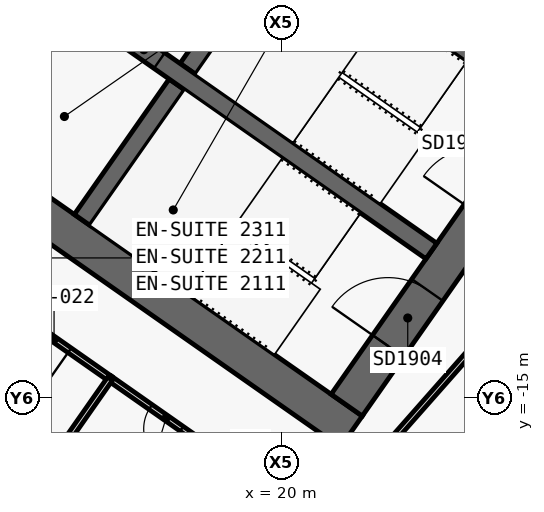
"""IFC4 building model, lengths in metres.
Left out: names, types, materials, properties, quantities, classifications, styles, units other than length and angle.
Written with IfcOpenShell. Run it as: python <this file> out.ifc"""

import sys

from ifc_helpers import new_model, si_unit, direction, frame, frame_2d, origin, place, context, subcontext, project, spatial, polyline, rectangle, outline, extrude, element, fill, save


model = new_model("IFC4")
c1 = context("Model", 3, precision=1e-05, world=origin(), true_north=direction((0.0, 1.0)))
c2 = subcontext(c1, "Body", "Model", "MODEL_VIEW")
j1 = project(units=[si_unit("LENGTHUNIT", "METRE"), si_unit("PLANEANGLEUNIT", "RADIAN")], contexts=[c1])
p1 = place(None, origin())
s1 = spatial("IfcSite", under=j1, at=p1, CompositionType="ELEMENT")
p2 = place(p1, origin())
s2 = spatial("IfcBuilding", under=s1, at=p2, CompositionType="ELEMENT")
p3 = place(p2, frame((0.0, 0.0, 101.3)))
s3 = spatial("IfcBuildingStorey", under=s2, at=p3, CompositionType="ELEMENT", Elevation=101.3)
p4 = place(p3, frame((-0.037, 11.867, 0.0), z_axis=(0.0, 0.0, 1.0), x_axis=(0.819155306259, -0.573571777746, 0.0)))
e1 = element("IfcWall", 1, at=p4, inside=s3, PredefinedType="SHEAR", context=c2, shape_type="SweptSolid", body=[
    extrude(outline(polyline([(33.837, 0.5), (0.0, 0.5), (0.7, -0.5), (33.837, -0.5), (33.837, 0.5)])), origin(), (0.0, 0.0, 1.0), 3.6),
])
p5 = place(p3, frame((-0.037, -0.585, 0.0), z_axis=(0.0, 0.0, 1.0), x_axis=(0.819157152511, -0.573569140985, 0.0)))
e2 = element("IfcWall", 2, at=p5, inside=s3, PredefinedType="SHEAR", context=c2, shape_type="SweptSolid", body=[
    extrude(outline(polyline([(26.695, 0.5), (0.0, 0.5), (0.7, -0.5), (26.695, -0.5), (26.695, 0.5)])), origin(), (0.0, 0.0, 1.0), 3.6),
])
p6 = place(p5, frame((1.045, 0.0, 0.0)))
e3 = element("IfcOpeningElement", 3, at=p6, cuts=e2, PredefinedType="OPENING", context=c2, shape_type="SweptSolid", body=[
    extrude(rectangle(XDim=1.5, YDim=2.1, at=frame_2d((0.75, 1.05))), frame((0.0, 0.51, 0.0), z_axis=(0.0, -1.0, 0.0), x_axis=(1.0, 0.0, 0.0)), (0.0, 0.0, 1.0), 1.02),
])
p7 = place(p5, frame((12.445, 0.0, 0.0)))
e4 = element("IfcOpeningElement", 4, at=p7, cuts=e2, PredefinedType="OPENING", context=c2, shape_type="SweptSolid", body=[
    extrude(rectangle(XDim=1.5, YDim=2.1, at=frame_2d((0.75, 1.05))), frame((0.0, 0.51, 0.0), z_axis=(0.0, -1.0, 0.0), x_axis=(1.0, 0.0, 0.0)), (0.0, 0.0, 1.0), 1.02),
])
p8 = place(p3, frame((21.708, -15.2, 0.0), z_axis=(0.0, 0.0, 1.0), x_axis=(0.573576324356, 0.819152122709, 0.0)))
e5 = element("IfcWall", 5, at=p8, inside=s3, PredefinedType="SHEAR", context=c2, shape_type="SweptSolid", body=[
    extrude(outline(polyline([(9.2, 0.5), (0.0, 0.5), (0.0, -0.5), (9.2, -0.5), (9.2, 0.5)])), origin(), (0.0, 0.0, 1.0), 3.6),
])
p9 = place(p8, frame((6.1, 0.0, 0.0)))
e6 = element("IfcOpeningElement", 6, at=p9, cuts=e5, PredefinedType="OPENING", context=c2, shape_type="SweptSolid", body=[
    extrude(rectangle(XDim=1.8, YDim=2.1, at=frame_2d((0.9, 1.05))), frame((0.0, 0.51, 0.0), z_axis=(0.0, -1.0, 0.0), x_axis=(1.0, 0.0, 0.0)), (0.0, 0.0, 1.0), 1.02),
])
p10 = place(p8, frame((1.9, 0.0, 0.0)))
e7 = element("IfcOpeningElement", 7, at=p10, cuts=e5, PredefinedType="OPENING", context=c2, shape_type="SweptSolid", body=[
    extrude(rectangle(XDim=1.8, YDim=2.1, at=frame_2d((0.9, 1.05))), frame((0.0, 0.51, 0.0), z_axis=(0.0, -1.0, 0.0), x_axis=(1.0, 0.0, 0.0)), (0.0, 0.0, 1.0), 1.02),
])
p11 = place(p3, frame((14.745, -10.324, 0.0), z_axis=(0.0, 0.0, 1.0), x_axis=(0.57356780395, 0.819158088694, 0.0)))
e8 = element("IfcWall", 8, at=p11, inside=s3, PredefinedType="SHEAR", context=c2, shape_type="SweptSolid", body=[
    extrude(outline(polyline([(0.0, 0.25), (0.0, -0.25), (4.35, -0.25), (4.35, 0.25), (0.0, 0.25)])), origin(), (0.0, 0.0, 1.0), 3.6),
])
p12 = place(p3, frame((17.527, -6.352, 0.0), z_axis=(0.0, 0.0, 1.0), x_axis=(0.573530143085, 0.819184457233, 0.0)))
e9 = element("IfcWall", 9, at=p12, inside=s3, PredefinedType="SHEAR", context=c2, shape_type="SweptSolid", body=[
    extrude(outline(polyline([(4.35, -0.25), (4.35, 0.25), (0.0, 0.25), (0.0, -0.25), (4.35, -0.25)])), origin(), (0.0, 0.0, 1.0), 3.6),
])
p13 = place(p3, frame((2.638, 3.768, 0.0), z_axis=(0.0, 0.0, 1.0), x_axis=(0.819148977158, -0.573580816643, 0.0)))
e10 = element("IfcWall", 10, at=p13, inside=s3, PredefinedType="SHEAR", context=c2, shape_type="SweptSolid", body=[
    extrude(outline(polyline([(0.0, 0.25), (0.0, -0.25), (26.0, -0.25), (26.0, 0.25), (0.0, 0.25)])), origin(), (0.0, 0.0, 1.0), 3.6),
])
p14 = place(p13, frame((9.637, 0.0, 0.0)))
e11 = element("IfcOpeningElement", 11, at=p14, cuts=e10, PredefinedType="OPENING", context=c2, shape_type="SweptSolid", body=[
    extrude(rectangle(XDim=1.2, YDim=2.1, at=frame_2d((0.6, 1.05))), frame((0.0, 0.26, 0.0), z_axis=(0.0, -1.0, 0.0), x_axis=(1.0, 0.0, 0.0)), (0.0, 0.0, 1.0), 0.52),
])
p15 = place(p13, frame((11.812, 0.0, 0.0)))
e12 = element("IfcOpeningElement", 12, at=p15, cuts=e10, PredefinedType="OPENING", context=c2, shape_type="SweptSolid", body=[
    extrude(rectangle(XDim=1.2, YDim=2.1, at=frame_2d((0.6, 1.05))), frame((0.0, 0.26, 0.0), z_axis=(0.0, -1.0, 0.0), x_axis=(1.0, 0.0, 0.0)), (0.0, 0.0, 1.0), 0.52),
])
p16 = place(p13, frame((13.988, 0.0, 0.0)))
e13 = element("IfcOpeningElement", 13, at=p16, cuts=e10, PredefinedType="OPENING", context=c2, shape_type="SweptSolid", body=[
    extrude(rectangle(XDim=1.2, YDim=2.1, at=frame_2d((0.6, 1.05))), frame((0.0, 0.26, 0.0), z_axis=(0.0, -1.0, 0.0), x_axis=(1.0, 0.0, 0.0)), (0.0, 0.0, 1.0), 0.52),
])
p17 = place(p13, frame((16.262, 0.0, 0.0)))
e14 = element("IfcOpeningElement", 14, at=p17, cuts=e10, PredefinedType="OPENING", context=c2, shape_type="SweptSolid", body=[
    extrude(rectangle(XDim=1.0, YDim=2.1, at=frame_2d((0.5, 1.05))), frame((0.0, 0.26, 0.0), z_axis=(0.0, -1.0, 0.0), x_axis=(1.0, 0.0, 0.0)), (0.0, 0.0, 1.0), 0.52),
])
p18 = place(p3, frame((15.483, -14.504, 0.0), z_axis=(0.0, 0.0, 1.0), x_axis=(-0.819145961204, 0.573585123798, 0.0)))
e15 = element("IfcWall", 15, at=p18, inside=s3, PredefinedType="PARTITIONING", context=c2, shape_type="SweptSolid", body=[
    extrude(rectangle(XDim=3.603, YDim=0.15, at=frame_2d((1.802, 0.0))), origin(), (0.0, 0.0, 1.0), 2.6),
])
p19 = place(p18, frame((1.302, 0.0, 0.0)))
e16 = element("IfcOpeningElement", 16, at=p19, cuts=e15, PredefinedType="OPENING", context=c2, shape_type="SweptSolid", body=[
    extrude(rectangle(XDim=1.0, YDim=2.1, at=frame_2d((0.5, 1.05))), frame((0.0, 0.085, 0.0), z_axis=(0.0, -1.0, 0.0), x_axis=(1.0, 0.0, 0.0)), (0.0, 0.0, 1.0), 0.17),
])
p20 = place(p3, frame((18.431, -16.568, 0.0), z_axis=(0.0, 0.0, 1.0), x_axis=(-0.819145961204, 0.573585123798, 0.0)))
e17 = element("IfcWall", 17, at=p20, inside=s3, PredefinedType="PARTITIONING", context=c2, shape_type="SweptSolid", body=[
    extrude(rectangle(XDim=3.603, YDim=0.15, at=frame_2d((1.802, 0.0))), origin(), (0.0, 0.0, 1.0), 3.32),
])
p21 = place(p20, frame((1.301, 0.0, 0.0)))
e18 = element("IfcOpeningElement", 18, at=p21, cuts=e17, PredefinedType="OPENING", context=c2, shape_type="SweptSolid", body=[
    extrude(rectangle(XDim=1.0, YDim=2.1, at=frame_2d((0.5, 1.05))), frame((0.0, 0.085, 0.0), z_axis=(0.0, -1.0, 0.0), x_axis=(1.0, 0.0, 0.0)), (0.0, 0.0, 1.0), 0.17),
])
p22 = place(p3, frame((25.493, -15.895, 0.0), z_axis=(0.0, 0.0, 1.0), x_axis=(-0.573588285102, -0.819143747577, 0.0)))
e19 = element("IfcWall", 19, at=p22, inside=s3, PredefinedType="PARTITIONING", context=c2, shape_type="SweptSolid", body=[
    extrude(rectangle(XDim=2.602, YDim=0.15, at=frame_2d((1.301, 0.0))), origin(), (0.0, 0.0, 1.0), 2.6),
])
p23 = place(p3, frame((22.285, -16.825, 0.0), z_axis=(0.0, 0.0, 1.0), x_axis=(0.661551268245, 0.749899939647, 0.0)))
e20 = element("IfcWall", 20, at=p23, inside=s3, PredefinedType="PARTITIONING", context=c2, shape_type="SweptSolid", body=[
    extrude(rectangle(XDim=6.541, YDim=0.15, at=frame_2d((3.271, 0.0))), origin(), (0.0, 0.0, 1.0), 2.6),
])
p24 = place(p3, frame((15.481, -14.503, 0.0), z_axis=(0.0, 0.0, 1.0), x_axis=(-0.573572324301, -0.819154923562, 0.0)))
e21 = element("IfcWall", 21, at=p24, inside=s3, PredefinedType="PARTITIONING", context=c2, shape_type="SweptSolid", body=[
    extrude(rectangle(XDim=7.3, YDim=0.15, at=frame_2d((3.65, 0.0))), origin(), (0.0, 0.0, 1.0), 2.5),
])
p25 = place(p17, origin())
e22 = element("IfcDoor", 22, at=p25, inside=s3, OperationType="SINGLE_SWING_RIGHT", PredefinedType="DOOR", context=c2, shape_type="SweptSolid", body=[
    extrude(rectangle(XDim=1.0, YDim=2.1, at=frame_2d((0.5, 1.05))), frame((0.0, 0.025, 0.0), z_axis=(0.0, -1.0, 0.0), x_axis=(1.0, 0.0, 0.0)), (0.0, 0.0, 1.0), 0.05),
])
fill(e14, e22)
p26 = place(p10, origin())
e23 = element("IfcDoor", 23, at=p26, inside=s3, OperationType="DOUBLE_DOOR_SINGLE_SWING", PredefinedType="DOOR", context=c2, shape_type="SweptSolid", body=[
    extrude(rectangle(XDim=1.8, YDim=2.1, at=frame_2d((0.9, 1.05))), frame((0.0, 0.025, 0.0), z_axis=(0.0, -1.0, 0.0), x_axis=(1.0, 0.0, 0.0)), (0.0, 0.0, 1.0), 0.05),
])
fill(e7, e23)
p27 = place(p19, origin())
e24 = element("IfcDoor", 24, at=p27, inside=s3, OperationType="SINGLE_SWING_RIGHT", PredefinedType="DOOR", context=c2, shape_type="SweptSolid", body=[
    extrude(rectangle(XDim=1.0, YDim=2.1, at=frame_2d((0.5, 1.05))), frame((0.0, 0.025, 0.0), z_axis=(0.0, -1.0, 0.0), x_axis=(1.0, 0.0, 0.0)), (0.0, 0.0, 1.0), 0.05),
])
fill(e16, e24)
p28 = place(p21, origin())
e25 = element("IfcDoor", 25, at=p28, inside=s3, OperationType="SINGLE_SWING_RIGHT", PredefinedType="DOOR", context=c2, shape_type="SweptSolid", body=[
    extrude(rectangle(XDim=1.0, YDim=2.1, at=frame_2d((0.5, 1.05))), frame((0.0, 0.025, 0.0), z_axis=(0.0, -1.0, 0.0), x_axis=(1.0, 0.0, 0.0)), (0.0, 0.0, 1.0), 0.05),
])
fill(e18, e25)
save(model, sys.argv[1])
